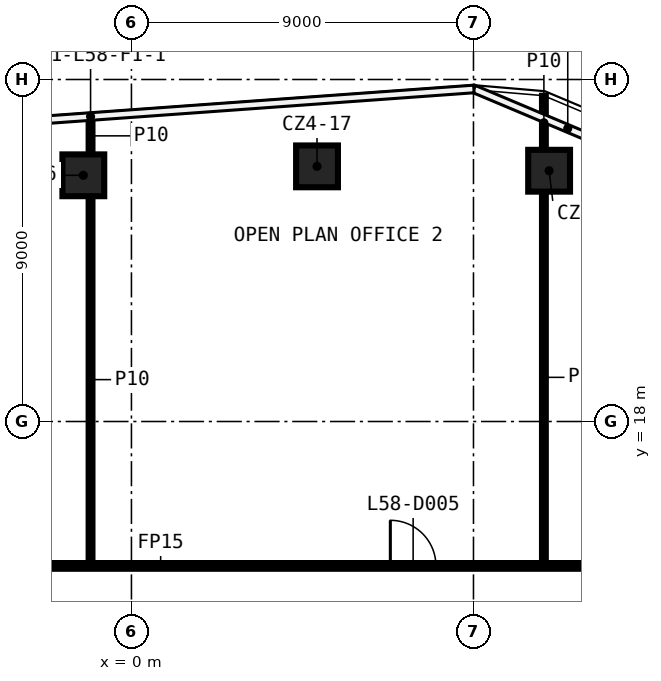
"""IFC4 building model, lengths in metres.
Left out: names, types, materials, properties, quantities, classifications, styles, units other than length and angle.
Written with IfcOpenShell. Run it as: python <this file> out.ifc"""

import sys

from ifc_helpers import new_model, si_unit, direction, frame, frame_2d, origin, origin_2d, place, context, subcontext, project, spatial, rectangle, extrude, element, fill, save


model = new_model("IFC4")
c1 = context("Model", 3, precision=1e-05, world=origin(), true_north=direction((0.0, 1.0)))
c2 = subcontext(c1, "Body", "Model", "MODEL_VIEW")
j1 = project(units=[si_unit("LENGTHUNIT", "METRE"), si_unit("PLANEANGLEUNIT", "RADIAN")], contexts=[c1])
p1 = place(None, origin())
s1 = spatial("IfcSite", under=j1, at=p1, CompositionType="ELEMENT")
p2 = place(p1, origin())
s2 = spatial("IfcBuilding", under=s1, at=p2, CompositionType="ELEMENT")
p3 = place(p2, frame((0.0, 0.0, 274.8)))
s3 = spatial("IfcBuildingStorey", under=s2, at=p3, CompositionType="ELEMENT", Elevation=274.8)
for number, where, z_axis, x_axis in (
    (1, (-1.266, 24.479, 0.0), (0.0, 0.0, 1.0), (1.0, 0.0, 0.0)),
    (2, (4.883, 24.714, 0.0), (0.0, 0.0, 1.0), (1.0, 0.0, 0.0)),
    (3, (10.99, 24.599, 0.0), (0.0, 0.0, 1.0), (1.0, 0.0, 0.0)),
):
    element("IfcColumn", number, at=place(p3, frame(where, z_axis=z_axis, x_axis=x_axis)), inside=s3, PredefinedType="COLUMN", context=c2, shape_type="SweptSolid", body=[
        extrude(rectangle(XDim=1.1, YDim=1.1, at=origin_2d()), origin(), (0.0, 0.0, 1.0), 3.82),
    ])
p4 = place(p3, frame((-5.075, 14.2, 0.0), z_axis=(0.0, 0.0, 1.0), x_axis=(1.0, 0.0, 0.0)))
e4 = element("IfcWall", 4, at=p4, inside=s3, PredefinedType="PARTITIONING", context=c2, shape_type="SweptSolid", body=[
    extrude(rectangle(XDim=22.35, YDim=0.15, at=frame_2d((11.175, 0.0))), origin(), (0.0, 0.0, 1.0), 3.82),
])
p5 = place(p4, frame((18.193, 0.0, 0.0)))
e5 = element("IfcOpeningElement", 5, at=p5, cuts=e4, PredefinedType="OPENING", context=c2, shape_type="SweptSolid", body=[
    extrude(rectangle(XDim=1.2, YDim=2.1, at=frame_2d((0.6, 1.05))), frame((0.0, 0.085, 0.0), z_axis=(0.0, -1.0, 0.0), x_axis=(1.0, 0.0, 0.0)), (0.0, 0.0, 1.0), 0.17),
])
p6 = place(p4, frame((11.887, 0.0, 0.0)))
e6 = element("IfcOpeningElement", 6, at=p6, cuts=e4, PredefinedType="OPENING", context=c2, shape_type="SweptSolid", body=[
    extrude(rectangle(XDim=1.2, YDim=2.1, at=frame_2d((0.6, 1.05))), frame((0.0, 0.085, 0.0), z_axis=(0.0, -1.0, 0.0), x_axis=(1.0, 0.0, 0.0)), (0.0, 0.0, 1.0), 0.17),
])
p7 = place(p3, frame((10.853, 14.275, 0.0), z_axis=(0.0, 0.0, 1.0), x_axis=(0.0, 1.0, 0.0)))
e7 = element("IfcWall", 7, at=p7, inside=s3, PredefinedType="PARTITIONING", context=c2, shape_type="SweptSolid", body=[
    extrude(rectangle(XDim=9.774, YDim=0.1, at=frame_2d((4.887, 0.0))), origin(), (0.0, 0.0, 1.0), 3.82),
])
p8 = place(p3, frame((10.853, 25.149, 0.0), z_axis=(0.0, 0.0, 1.0), x_axis=(0.0, 1.0, 0.0)))
e8 = element("IfcWall", 8, at=p8, inside=s3, PredefinedType="PARTITIONING", context=c2, shape_type="SweptSolid", body=[
    extrude(rectangle(XDim=1.423, YDim=0.1, at=frame_2d((0.712, 0.0))), origin(), (0.0, 0.0, 1.0), 3.82),
])
p9 = place(p3, frame((-1.076, 14.275, 0.0), z_axis=(0.0, 0.0, 1.0), x_axis=(0.0, 1.0, 0.0)))
e9 = element("IfcWall", 9, at=p9, inside=s3, PredefinedType="PARTITIONING", context=c2, shape_type="SweptSolid", body=[
    extrude(rectangle(XDim=9.654, YDim=0.1, at=frame_2d((4.827, 0.0))), origin(), (0.0, 0.0, 1.0), 3.82),
])
p10 = place(p3, frame((-1.076, 25.029, 0.0), z_axis=(0.0, 0.0, 1.0), x_axis=(0.0, 1.0, 0.0)))
e10 = element("IfcWall", 10, at=p10, inside=s3, PredefinedType="PARTITIONING", context=c2, shape_type="SweptSolid", body=[
    extrude(rectangle(XDim=0.976, YDim=0.1, at=frame_2d((0.488, 0.0))), origin(), (0.0, 0.0, 1.0), 3.82),
])
p11 = place(p6, origin())
e11 = element("IfcDoor", 11, at=p11, inside=s3, OperationType="SINGLE_SWING_RIGHT", PredefinedType="DOOR", context=c2, shape_type="SweptSolid", body=[
    extrude(rectangle(XDim=1.2, YDim=2.1, at=frame_2d((0.6, 1.05))), frame((0.0, 0.025, 0.0), z_axis=(0.0, -1.0, 0.0), x_axis=(1.0, 0.0, 0.0)), (0.0, 0.0, 1.0), 0.05),
])
fill(e6, e11)
save(model, sys.argv[1])
